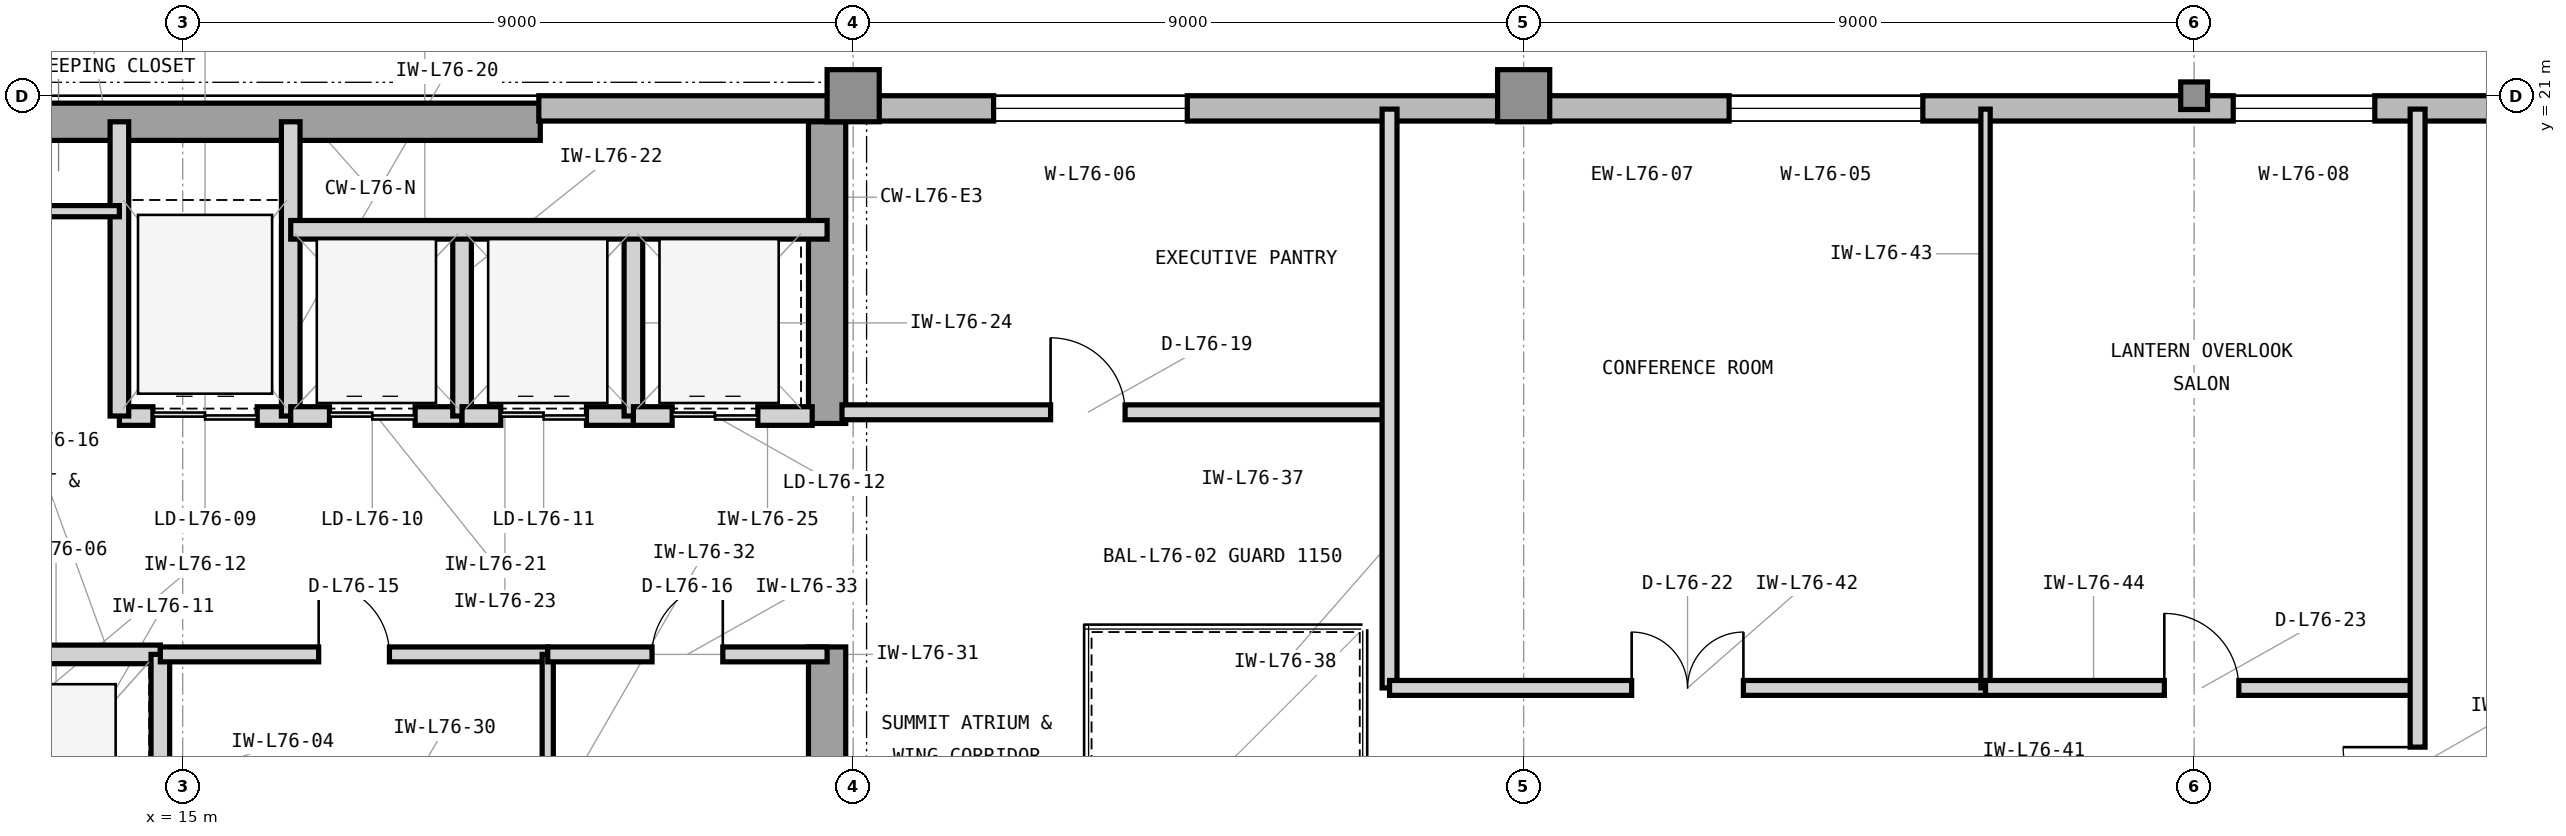
"""IFC4 building model, lengths in metres.
Left out: names, types, materials, properties, quantities, classifications, styles, units other than length and angle.
Written with IfcOpenShell. Run it as: python <this file> out.ifc"""

import sys

from ifc_helpers import new_model, si_unit, direction, frame, frame_2d, origin, origin_2d, place, context, subcontext, project, spatial, rectangle, i_section, extrude, element, fill, save


model = new_model("IFC4")
c1 = context("Model", 3, precision=1e-05, world=origin(), true_north=direction((0.0, 1.0)))
c2 = subcontext(c1, "Body", "Model", "MODEL_VIEW")
j1 = project(units=[si_unit("LENGTHUNIT", "METRE"), si_unit("PLANEANGLEUNIT", "RADIAN")], contexts=[c1])
p1 = place(None, origin())
s1 = spatial("IfcSite", under=j1, at=p1, CompositionType="ELEMENT")
p2 = place(p1, origin())
s2 = spatial("IfcBuilding", under=s1, at=p2, CompositionType="ELEMENT")
p3 = place(p2, frame((0.0, 0.0, 309.3)))
s3 = spatial("IfcBuildingStorey", under=s2, at=p3, CompositionType="ELEMENT", Elevation=309.3)
p4 = place(p3, frame((7.475, 20.65, 0.0), z_axis=(0.0, 0.0, 1.0), x_axis=(1.0, 0.0, 0.0)))
e1 = element("IfcWall", 1, at=p4, inside=s3, PredefinedType="SHEAR", context=c2, shape_type="SweptSolid", body=[
    extrude(rectangle(XDim=12.325, YDim=0.5, at=frame_2d((6.163, 0.0))), origin(), (0.0, 0.0, 1.0), 3.9),
])
p5 = place(p3, frame((23.65, 10.4, 0.0), z_axis=(0.0, 0.0, 1.0), x_axis=(0.0, 1.0, 0.0)))
e2 = element("IfcWall", 2, at=p5, inside=s3, PredefinedType="SHEAR", context=c2, shape_type="SweptSolid", body=[
    extrude(rectangle(XDim=3.2, YDim=0.5, at=frame_2d((1.6, 0.0))), origin(), (0.0, 0.0, 1.0), 3.9),
])
p6 = place(p3, frame((23.65, 16.6, 0.0), z_axis=(0.0, 0.0, 1.0), x_axis=(0.0, 1.0, 0.0)))
e3 = element("IfcWall", 3, at=p6, inside=s3, PredefinedType="SHEAR", context=c2, shape_type="SweptSolid", body=[
    extrude(rectangle(XDim=4.05, YDim=0.5, at=frame_2d((2.025, 0.0))), origin(), (0.0, 0.0, 1.0), 3.9),
])
for number, where, z_axis, x_axis in (
    (4, (24.0, 21.0, 0.0), (0.0, 0.0, 1.0), (1.0, 0.0, 0.0)),
    (5, (33.0, 21.0, 0.0), (0.0, 0.0, 1.0), (1.0, 0.0, 0.0)),
):
    element("IfcColumn", number, at=place(p3, frame(where, z_axis=z_axis, x_axis=x_axis)), inside=s3, PredefinedType="COLUMN", context=c2, shape_type="SweptSolid", body=[
        extrude(rectangle(XDim=0.7, YDim=0.7, at=origin_2d()), origin(), (0.0, 0.0, 1.0), 3.9),
    ])
p7 = place(p3, frame((42.0, 21.0, 0.0), z_axis=(0.0, 0.0, 1.0), x_axis=(1.0, 0.0, 0.0)))
e6 = element("IfcColumn", 6, at=p7, inside=s3, PredefinedType="COLUMN", context=c2, shape_type="SweptSolid", body=[
    extrude(i_section(OverallWidth=0.37, OverallDepth=0.36, WebThickness=0.012, FlangeThickness=0.02, FilletRadius=0.016, at=origin_2d()), origin(), (0.0, 0.0, 1.0), 3.9),
])
p8 = place(p3, frame((49.4, 20.83, 0.0), z_axis=(0.0, 0.0, 1.0), x_axis=(-1.0, 0.0, 0.0)))
e7 = element("IfcWall", 7, at=p8, inside=s3, PredefinedType="STANDARD", context=c2, shape_type="SweptSolid", body=[
    extrude(rectangle(XDim=29.62, YDim=0.34, at=frame_2d((14.81, 0.0))), origin(), (0.0, 0.0, 1.0), 3.62),
])
p9 = place(p8, frame((11.042, 0.0, 0.8)))
e8 = element("IfcOpeningElement", 8, at=p9, cuts=e7, PredefinedType="OPENING", context=c2, shape_type="SweptSolid", body=[
    extrude(rectangle(XDim=2.6, YDim=2.35, at=frame_2d((1.3, 1.175))), frame((0.0, 0.18, 0.0), z_axis=(0.0, -1.0, 0.0), x_axis=(1.0, 0.0, 0.0)), (0.0, 0.0, 1.0), 0.36),
])
p10 = place(p8, frame((20.915, 0.0, 0.8)))
e9 = element("IfcOpeningElement", 9, at=p10, cuts=e7, PredefinedType="OPENING", context=c2, shape_type="SweptSolid", body=[
    extrude(rectangle(XDim=2.6, YDim=2.35, at=frame_2d((1.3, 1.175))), frame((0.0, 0.18, 0.0), z_axis=(0.0, -1.0, 0.0), x_axis=(1.0, 0.0, 0.0)), (0.0, 0.0, 1.0), 0.36),
])
p11 = place(p8, frame((4.975, 0.0, 0.8)))
e10 = element("IfcOpeningElement", 10, at=p11, cuts=e7, PredefinedType="OPENING", context=c2, shape_type="SweptSolid", body=[
    extrude(rectangle(XDim=1.9, YDim=2.35, at=frame_2d((0.95, 1.175))), frame((0.0, 0.18, 0.0), z_axis=(0.0, -1.0, 0.0), x_axis=(1.0, 0.0, 0.0)), (0.0, 0.0, 1.0), 0.36),
])
p12 = place(p3, frame((11.95, 13.5, 0.0), z_axis=(0.0, 0.0, 1.0), x_axis=(1.0, 0.0, 0.0)))
e11 = element("IfcWall", 11, at=p12, inside=s3, PredefinedType="PARTITIONING", context=c2, shape_type="SweptSolid", body=[
    extrude(rectangle(XDim=2.75, YDim=0.25, at=frame_2d((1.375, 0.0))), origin(), (0.0, 0.0, 1.0), 3.203),
])
p13 = place(p3, frame((14.7, 10.5, 0.0), z_axis=(0.0, 0.0, 1.0), x_axis=(0.0, 1.0, 0.0)))
e12 = element("IfcWall", 12, at=p13, inside=s3, PredefinedType="PARTITIONING", context=c2, shape_type="SweptSolid", body=[
    extrude(rectangle(XDim=3.0, YDim=0.25, at=frame_2d((1.5, 0.0))), origin(), (0.0, 0.0, 1.0), 3.61),
])
p14 = place(p3, frame((14.15, 16.7, 0.0), z_axis=(0.0, 0.0, 1.0), x_axis=(1.0, 0.0, 0.0)))
e13 = element("IfcWall", 13, at=p14, inside=s3, PredefinedType="PARTITIONING", context=c2, shape_type="SweptSolid", body=[
    extrude(rectangle(XDim=2.3, YDim=0.25, at=frame_2d((1.15, 0.0))), origin(), (0.0, 0.0, 1.0), 3.203),
])
p15 = place(p14, frame((0.45, 0.0, 0.0)))
e14 = element("IfcOpeningElement", 14, at=p15, cuts=e13, PredefinedType="OPENING", context=c2, shape_type="SweptSolid", body=[
    extrude(rectangle(XDim=1.4, YDim=2.35, at=frame_2d((0.7, 1.175))), frame((0.0, 0.135, 0.0), z_axis=(0.0, -1.0, 0.0), x_axis=(1.0, 0.0, 0.0)), (0.0, 0.0, 1.0), 0.27),
])
for number, where, z_axis, x_axis in (
    (15, (14.15, 16.7, 0.0), (0.0, 0.0, 1.0), (0.0, 1.0, 0.0)),
    (16, (16.45, 16.7, 0.0), (0.0, 0.0, 1.0), (0.0, 1.0, 0.0)),
):
    element("IfcWall", number, at=place(p3, frame(where, z_axis=z_axis, x_axis=x_axis)), inside=s3, PredefinedType="PARTITIONING", context=c2, shape_type="SweptSolid", body=[
        extrude(rectangle(XDim=3.95, YDim=0.25, at=frame_2d((1.975, 0.0))), origin(), (0.0, 0.0, 1.0), 3.61),
    ])
p16 = place(p3, frame((16.45, 16.7, 0.0), z_axis=(0.0, 0.0, 1.0), x_axis=(1.0, 0.0, 0.0)))
e17 = element("IfcWall", 17, at=p16, inside=s3, PredefinedType="PARTITIONING", context=c2, shape_type="SweptSolid", body=[
    extrude(rectangle(XDim=2.3, YDim=0.25, at=frame_2d((1.15, 0.0))), origin(), (0.0, 0.0, 1.0), 3.203),
])
p17 = place(p16, frame((0.52, 0.0, 0.0)))
e18 = element("IfcOpeningElement", 18, at=p17, cuts=e17, PredefinedType="OPENING", context=c2, shape_type="SweptSolid", body=[
    extrude(rectangle(XDim=1.15, YDim=2.25, at=frame_2d((0.575, 1.125))), frame((0.0, 0.135, 0.0), z_axis=(0.0, -1.0, 0.0), x_axis=(1.0, 0.0, 0.0)), (0.0, 0.0, 1.0), 0.27),
])
p18 = place(p3, frame((18.75, 16.7, 0.0), z_axis=(0.0, 0.0, 1.0), x_axis=(0.0, 1.0, 0.0)))
e19 = element("IfcWall", 19, at=p18, inside=s3, PredefinedType="PARTITIONING", context=c2, shape_type="SweptSolid", body=[
    extrude(rectangle(XDim=2.5, YDim=0.25, at=frame_2d((1.25, 0.0))), origin(), (0.0, 0.0, 1.0), 3.61),
])
p19 = place(p3, frame((18.75, 16.7, 0.0), z_axis=(0.0, 0.0, 1.0), x_axis=(1.0, 0.0, 0.0)))
e20 = element("IfcWall", 20, at=p19, inside=s3, PredefinedType="PARTITIONING", context=c2, shape_type="SweptSolid", body=[
    extrude(rectangle(XDim=2.3, YDim=0.25, at=frame_2d((1.15, 0.0))), origin(), (0.0, 0.0, 1.0), 3.203),
])
p20 = place(p19, frame((0.52, 0.0, 0.0)))
e21 = element("IfcOpeningElement", 21, at=p20, cuts=e20, PredefinedType="OPENING", context=c2, shape_type="SweptSolid", body=[
    extrude(rectangle(XDim=1.15, YDim=2.25, at=frame_2d((0.575, 1.125))), frame((0.0, 0.135, 0.0), z_axis=(0.0, -1.0, 0.0), x_axis=(1.0, 0.0, 0.0)), (0.0, 0.0, 1.0), 0.27),
])
p21 = place(p3, frame((21.05, 16.7, 0.0), z_axis=(0.0, 0.0, 1.0), x_axis=(0.0, 1.0, 0.0)))
e22 = element("IfcWall", 22, at=p21, inside=s3, PredefinedType="PARTITIONING", context=c2, shape_type="SweptSolid", body=[
    extrude(rectangle(XDim=2.5, YDim=0.25, at=frame_2d((1.25, 0.0))), origin(), (0.0, 0.0, 1.0), 3.61),
])
p22 = place(p3, frame((21.05, 16.7, 0.0), z_axis=(0.0, 0.0, 1.0), x_axis=(1.0, 0.0, 0.0)))
e23 = element("IfcWall", 23, at=p22, inside=s3, PredefinedType="PARTITIONING", context=c2, shape_type="SweptSolid", body=[
    extrude(rectangle(XDim=2.4, YDim=0.25, at=frame_2d((1.2, 0.0))), origin(), (0.0, 0.0, 1.0), 3.203),
])
p23 = place(p22, frame((0.52, 0.0, 0.0)))
e24 = element("IfcOpeningElement", 24, at=p23, cuts=e23, PredefinedType="OPENING", context=c2, shape_type="SweptSolid", body=[
    extrude(rectangle(XDim=1.15, YDim=2.25, at=frame_2d((0.575, 1.125))), frame((0.0, 0.135, 0.0), z_axis=(0.0, -1.0, 0.0), x_axis=(1.0, 0.0, 0.0)), (0.0, 0.0, 1.0), 0.27),
])
p24 = place(p3, frame((16.45, 19.2, 0.0), z_axis=(0.0, 0.0, 1.0), x_axis=(1.0, 0.0, 0.0)))
e25 = element("IfcWall", 25, at=p24, inside=s3, PredefinedType="PARTITIONING", context=c2, shape_type="SweptSolid", body=[
    extrude(rectangle(XDim=7.2, YDim=0.25, at=frame_2d((3.6, 0.0))), origin(), (0.0, 0.0, 1.0), 3.61),
])
p25 = place(p3, frame((14.7, 13.5, 0.0), z_axis=(0.0, 0.0, 1.0), x_axis=(1.0, 0.0, 0.0)))
e26 = element("IfcWall", 26, at=p25, inside=s3, PredefinedType="PARTITIONING", context=c2, shape_type="SweptSolid", body=[
    extrude(rectangle(XDim=5.2, YDim=0.2, at=frame_2d((2.6, 0.0))), origin(), (0.0, 0.0, 1.0), 3.203),
])
p26 = place(p25, frame((2.125, 0.0, 0.0)))
e27 = element("IfcOpeningElement", 27, at=p26, cuts=e26, PredefinedType="OPENING", context=c2, shape_type="SweptSolid", body=[
    extrude(rectangle(XDim=0.95, YDim=2.1, at=frame_2d((0.475, 1.05))), frame((0.0, 0.11, 0.0), z_axis=(0.0, -1.0, 0.0), x_axis=(1.0, 0.0, 0.0)), (0.0, 0.0, 1.0), 0.22),
])
p27 = place(p3, frame((19.9, 10.465, 0.0), z_axis=(0.0, 0.0, 1.0), x_axis=(0.0, 1.0, 0.0)))
e28 = element("IfcWall", 28, at=p27, inside=s3, PredefinedType="PARTITIONING", context=c2, shape_type="SweptSolid", body=[
    extrude(rectangle(XDim=3.035, YDim=0.15, at=frame_2d((1.518, 0.0))), origin(), (0.0, 0.0, 1.0), 3.61),
])
p28 = place(p3, frame((19.9, 13.5, 0.0), z_axis=(0.0, 0.0, 1.0), x_axis=(1.0, 0.0, 0.0)))
e29 = element("IfcWall", 29, at=p28, inside=s3, PredefinedType="PARTITIONING", context=c2, shape_type="SweptSolid", body=[
    extrude(rectangle(XDim=3.75, YDim=0.2, at=frame_2d((1.875, 0.0))), origin(), (0.0, 0.0, 1.0), 3.203),
])
p29 = place(p28, frame((1.4, 0.0, 0.0)))
e30 = element("IfcOpeningElement", 30, at=p29, cuts=e29, PredefinedType="OPENING", context=c2, shape_type="SweptSolid", body=[
    extrude(rectangle(XDim=0.95, YDim=2.1, at=frame_2d((0.475, 1.05))), frame((0.0, 0.11, 0.0), z_axis=(0.0, -1.0, 0.0), x_axis=(1.0, 0.0, 0.0)), (0.0, 0.0, 1.0), 0.22),
])
p30 = place(p3, frame((10.33, 19.45, 0.0), z_axis=(0.0, 0.0, 1.0), x_axis=(1.0, 0.0, 0.0)))
e31 = element("IfcWall", 31, at=p30, inside=s3, PredefinedType="PARTITIONING", context=c2, shape_type="SweptSolid", body=[
    extrude(rectangle(XDim=3.82, YDim=0.15, at=frame_2d((1.91, 0.0))), origin(), (0.0, 0.0, 1.0), 3.61),
])
p31 = place(p30, frame((1.25, 0.0, 0.0)))
e32 = element("IfcOpeningElement", 32, at=p31, cuts=e31, PredefinedType="OPENING", context=c2, shape_type="SweptSolid", body=[
    extrude(rectangle(XDim=0.95, YDim=2.1, at=frame_2d((0.475, 1.05))), frame((0.0, 0.085, 0.0), z_axis=(0.0, -1.0, 0.0), x_axis=(1.0, 0.0, 0.0)), (0.0, 0.0, 1.0), 0.17),
])
p32 = place(p3, frame((23.85, 16.75, 0.0), z_axis=(0.0, 0.0, 1.0), x_axis=(1.0, 0.0, 0.0)))
e33 = element("IfcWall", 33, at=p32, inside=s3, PredefinedType="PARTITIONING", context=c2, shape_type="SweptSolid", body=[
    extrude(rectangle(XDim=7.35, YDim=0.2, at=frame_2d((3.675, 0.0))), origin(), (0.0, 0.0, 1.0), 3.61),
])
p33 = place(p32, frame((2.8, 0.0, 0.0)))
e34 = element("IfcOpeningElement", 34, at=p33, cuts=e33, PredefinedType="OPENING", context=c2, shape_type="SweptSolid", body=[
    extrude(rectangle(XDim=1.0, YDim=2.15, at=frame_2d((0.5, 1.075))), frame((0.0, 0.11, 0.0), z_axis=(0.0, -1.0, 0.0), x_axis=(1.0, 0.0, 0.0)), (0.0, 0.0, 1.0), 0.22),
])
p34 = place(p3, frame((31.2, 13.05, 0.0), z_axis=(0.0, 0.0, 1.0), x_axis=(0.0, 1.0, 0.0)))
e35 = element("IfcWall", 35, at=p34, inside=s3, PredefinedType="PARTITIONING", context=c2, shape_type="SweptSolid", body=[
    extrude(rectangle(XDim=7.77, YDim=0.2, at=frame_2d((3.885, 0.0))), origin(), (0.0, 0.0, 1.0), 3.61),
])
p35 = place(p3, frame((31.2, 13.05, 0.0), z_axis=(0.0, 0.0, 1.0), x_axis=(1.0, 0.0, 0.0)))
e36 = element("IfcWall", 36, at=p35, inside=s3, PredefinedType="PARTITIONING", context=c2, shape_type="SweptSolid", body=[
    extrude(rectangle(XDim=8.0, YDim=0.2, at=frame_2d((4.0, 0.0))), origin(), (0.0, 0.0, 1.0), 3.61),
])
p36 = place(p35, frame((3.25, 0.0, 0.0)))
e37 = element("IfcOpeningElement", 37, at=p36, cuts=e36, PredefinedType="OPENING", context=c2, shape_type="SweptSolid", body=[
    extrude(rectangle(XDim=1.5, YDim=2.3, at=frame_2d((0.75, 1.15))), frame((0.0, 0.11, 0.0), z_axis=(0.0, -1.0, 0.0), x_axis=(1.0, 0.0, 0.0)), (0.0, 0.0, 1.0), 0.22),
])
p37 = place(p3, frame((39.2, 13.05, 0.0), z_axis=(0.0, 0.0, 1.0), x_axis=(0.0, 1.0, 0.0)))
e38 = element("IfcWall", 38, at=p37, inside=s3, PredefinedType="PARTITIONING", context=c2, shape_type="SweptSolid", body=[
    extrude(rectangle(XDim=7.77, YDim=0.125, at=frame_2d((3.885, 0.0))), origin(), (0.0, 0.0, 1.0), 3.61),
])
p38 = place(p3, frame((39.2, 13.05, 0.0), z_axis=(0.0, 0.0, 1.0), x_axis=(1.0, 0.0, 0.0)))
e39 = element("IfcWall", 39, at=p38, inside=s3, PredefinedType="PARTITIONING", context=c2, shape_type="SweptSolid", body=[
    extrude(rectangle(XDim=5.8, YDim=0.2, at=frame_2d((2.9, 0.0))), origin(), (0.0, 0.0, 1.0), 3.61),
])
p39 = place(p38, frame((2.4, 0.0, 0.0)))
e40 = element("IfcOpeningElement", 40, at=p39, cuts=e39, PredefinedType="OPENING", context=c2, shape_type="SweptSolid", body=[
    extrude(rectangle(XDim=1.0, YDim=2.15, at=frame_2d((0.5, 1.075))), frame((0.0, 0.11, 0.0), z_axis=(0.0, -1.0, 0.0), x_axis=(1.0, 0.0, 0.0)), (0.0, 0.0, 1.0), 0.22),
])
p40 = place(p3, frame((45.0, 3.18, 0.0), z_axis=(0.0, 0.0, 1.0), x_axis=(0.0, 1.0, 0.0)))
e41 = element("IfcWall", 41, at=p40, inside=s3, PredefinedType="PARTITIONING", context=c2, shape_type="SweptSolid", body=[
    extrude(rectangle(XDim=17.64, YDim=0.2, at=frame_2d((8.82, 0.0))), origin(), (0.0, 0.0, 1.0), 3.61),
])
p41 = place(p40, frame((8.075, 0.0, 0.0)))
e42 = element("IfcOpeningElement", 42, at=p41, cuts=e41, PredefinedType="OPENING", context=c2, shape_type="SweptSolid", body=[
    extrude(rectangle(XDim=1.0, YDim=2.15, at=frame_2d((0.5, 1.075))), frame((0.0, 0.11, 0.0), z_axis=(0.0, -1.0, 0.0), x_axis=(1.0, 0.0, 0.0)), (0.0, 0.0, 1.0), 0.22),
])
p42 = place(p9, origin())
e43 = element("IfcWindow", 43, at=p42, inside=s3, PartitioningType="SINGLE_PANEL", PredefinedType="WINDOW", context=c2, shape_type="SweptSolid", body=[
    extrude(rectangle(XDim=2.6, YDim=2.35, at=frame_2d((1.3, 1.175))), frame((0.0, 0.11, 0.0), z_axis=(0.0, -1.0, 0.0), x_axis=(1.0, 0.0, 0.0)), (0.0, 0.0, 1.0), 0.06),
])
fill(e8, e43)
p43 = place(p10, origin())
e44 = element("IfcWindow", 44, at=p43, inside=s3, PartitioningType="SINGLE_PANEL", PredefinedType="WINDOW", context=c2, shape_type="SweptSolid", body=[
    extrude(rectangle(XDim=2.6, YDim=2.35, at=frame_2d((1.3, 1.175))), frame((0.0, 0.11, 0.0), z_axis=(0.0, -1.0, 0.0), x_axis=(1.0, 0.0, 0.0)), (0.0, 0.0, 1.0), 0.06),
])
fill(e9, e44)
p44 = place(p15, origin())
e45 = element("IfcDoor", 45, at=p44, inside=s3, OperationType="DOUBLE_DOOR_SLIDING", PredefinedType="DOOR", context=c2, shape_type="SweptSolid", body=[
    extrude(rectangle(XDim=1.4, YDim=2.35, at=frame_2d((0.7, 1.175))), frame((0.0, 0.025, 0.0), z_axis=(0.0, -1.0, 0.0), x_axis=(1.0, 0.0, 0.0)), (0.0, 0.0, 1.0), 0.05),
])
fill(e14, e45)
p45 = place(p17, origin())
e46 = element("IfcDoor", 46, at=p45, inside=s3, OperationType="DOUBLE_DOOR_SLIDING", PredefinedType="DOOR", context=c2, shape_type="SweptSolid", body=[
    extrude(rectangle(XDim=1.15, YDim=2.25, at=frame_2d((0.575, 1.125))), frame((0.0, 0.025, 0.0), z_axis=(0.0, -1.0, 0.0), x_axis=(1.0, 0.0, 0.0)), (0.0, 0.0, 1.0), 0.05),
])
fill(e18, e46)
p46 = place(p20, origin())
e47 = element("IfcDoor", 47, at=p46, inside=s3, OperationType="DOUBLE_DOOR_SLIDING", PredefinedType="DOOR", context=c2, shape_type="SweptSolid", body=[
    extrude(rectangle(XDim=1.15, YDim=2.25, at=frame_2d((0.575, 1.125))), frame((0.0, 0.025, 0.0), z_axis=(0.0, -1.0, 0.0), x_axis=(1.0, 0.0, 0.0)), (0.0, 0.0, 1.0), 0.05),
])
fill(e21, e47)
p47 = place(p23, origin())
e48 = element("IfcDoor", 48, at=p47, inside=s3, OperationType="DOUBLE_DOOR_SLIDING", PredefinedType="DOOR", context=c2, shape_type="SweptSolid", body=[
    extrude(rectangle(XDim=1.15, YDim=2.25, at=frame_2d((0.575, 1.125))), frame((0.0, 0.025, 0.0), z_axis=(0.0, -1.0, 0.0), x_axis=(1.0, 0.0, 0.0)), (0.0, 0.0, 1.0), 0.05),
])
fill(e24, e48)
p48 = place(p26, origin())
e49 = element("IfcDoor", 49, at=p48, inside=s3, OperationType="SINGLE_SWING_LEFT", PredefinedType="DOOR", context=c2, shape_type="SweptSolid", body=[
    extrude(rectangle(XDim=0.95, YDim=2.1, at=frame_2d((0.475, 1.05))), frame((0.0, 0.025, 0.0), z_axis=(0.0, -1.0, 0.0), x_axis=(1.0, 0.0, 0.0)), (0.0, 0.0, 1.0), 0.05),
])
fill(e27, e49)
p49 = place(p29, origin())
e50 = element("IfcDoor", 50, at=p49, inside=s3, OperationType="SINGLE_SWING_RIGHT", PredefinedType="DOOR", context=c2, shape_type="SweptSolid", body=[
    extrude(rectangle(XDim=0.95, YDim=2.1, at=frame_2d((0.475, 1.05))), frame((0.0, 0.025, 0.0), z_axis=(0.0, -1.0, 0.0), x_axis=(1.0, 0.0, 0.0)), (0.0, 0.0, 1.0), 0.05),
])
fill(e30, e50)
p50 = place(p33, origin())
e51 = element("IfcDoor", 51, at=p50, inside=s3, OperationType="SINGLE_SWING_LEFT", PredefinedType="DOOR", context=c2, shape_type="SweptSolid", body=[
    extrude(rectangle(XDim=1.0, YDim=2.15, at=frame_2d((0.5, 1.075))), frame((0.0, 0.025, 0.0), z_axis=(0.0, -1.0, 0.0), x_axis=(1.0, 0.0, 0.0)), (0.0, 0.0, 1.0), 0.05),
])
fill(e34, e51)
p51 = place(p36, origin())
e52 = element("IfcDoor", 52, at=p51, inside=s3, OperationType="DOUBLE_DOOR_SINGLE_SWING", PredefinedType="DOOR", context=c2, shape_type="SweptSolid", body=[
    extrude(rectangle(XDim=1.5, YDim=2.3, at=frame_2d((0.75, 1.15))), frame((0.0, 0.025, 0.0), z_axis=(0.0, -1.0, 0.0), x_axis=(1.0, 0.0, 0.0)), (0.0, 0.0, 1.0), 0.05),
])
fill(e37, e52)
p52 = place(p39, origin())
e53 = element("IfcDoor", 53, at=p52, inside=s3, OperationType="SINGLE_SWING_LEFT", PredefinedType="DOOR", context=c2, shape_type="SweptSolid", body=[
    extrude(rectangle(XDim=1.0, YDim=2.15, at=frame_2d((0.5, 1.075))), frame((0.0, 0.025, 0.0), z_axis=(0.0, -1.0, 0.0), x_axis=(1.0, 0.0, 0.0)), (0.0, 0.0, 1.0), 0.05),
])
fill(e40, e53)
p53 = place(p41, origin())
e54 = element("IfcDoor", 54, at=p53, inside=s3, OperationType="SINGLE_SWING_RIGHT", PredefinedType="DOOR", context=c2, shape_type="SweptSolid", body=[
    extrude(rectangle(XDim=1.0, YDim=2.15, at=frame_2d((0.5, 1.075))), frame((0.0, 0.025, 0.0), z_axis=(0.0, -1.0, 0.0), x_axis=(1.0, 0.0, 0.0)), (0.0, 0.0, 1.0), 0.05),
])
fill(e42, e54)
p54 = place(p11, origin())
e55 = element("IfcWindow", 55, at=p54, inside=s3, PartitioningType="SINGLE_PANEL", PredefinedType="WINDOW", context=c2, shape_type="SweptSolid", body=[
    extrude(rectangle(XDim=1.9, YDim=2.35, at=frame_2d((0.95, 1.175))), frame((0.0, 0.11, 0.0), z_axis=(0.0, -1.0, 0.0), x_axis=(1.0, 0.0, 0.0)), (0.0, 0.0, 1.0), 0.06),
])
fill(e10, e55)
save(model, sys.argv[1])
